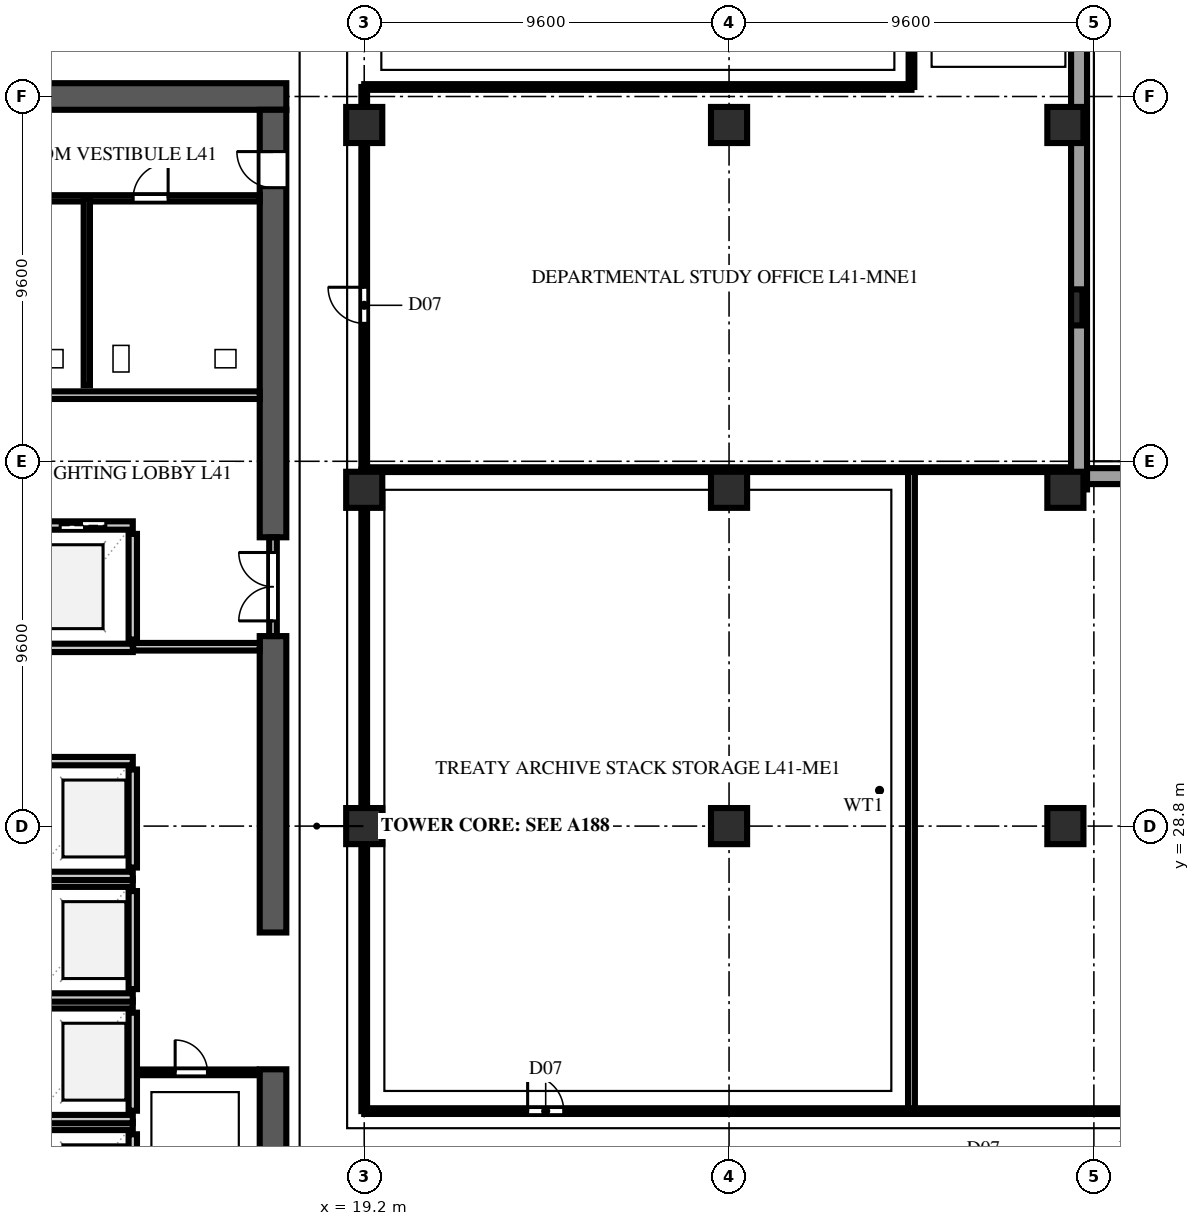
"""IFC4 building model, lengths in metres.
Left out: names, types, materials, properties, quantities, classifications, styles, units other than length and angle.
Written with IfcOpenShell. Run it as: python <this file> out.ifc"""

import sys

from ifc_helpers import new_model, si_unit, direction, frame, frame_2d, origin, origin_2d, place, context, subcontext, project, spatial, rectangle, extrude, element, fill, save


model = new_model("IFC4")
c1 = context("Model", 3, precision=1e-05, world=origin(), true_north=direction((0.0, 1.0)))
c2 = subcontext(c1, "Body", "Model", "MODEL_VIEW")
j1 = project(units=[si_unit("LENGTHUNIT", "METRE"), si_unit("PLANEANGLEUNIT", "RADIAN")], contexts=[c1])
p1 = place(None, origin())
s1 = spatial("IfcSite", under=j1, at=p1, CompositionType="ELEMENT")
p2 = place(p1, origin())
s2 = spatial("IfcBuilding", under=s1, at=p2, CompositionType="ELEMENT")
p3 = place(p2, frame((0.0, 0.0, 163.6)))
s3 = spatial("IfcBuildingStorey", under=s2, at=p3, CompositionType="ELEMENT", Elevation=163.6)
p4 = place(p3, frame((2.55, 48.0, 0.0), z_axis=(0.0, 0.0, 1.0), x_axis=(1.0, 0.0, 0.0)))
e1 = element("IfcWall", 1, at=p4, inside=s3, PredefinedType="SHEAR", context=c2, shape_type="SweptSolid", body=[
    extrude(rectangle(XDim=14.6, YDim=0.7, at=frame_2d((7.3, 0.0))), origin(), (0.0, 0.0, 1.0), 3.54),
])
p5 = place(p3, frame((16.8, 9.95, 0.0), z_axis=(0.0, 0.0, 1.0), x_axis=(0.0, 1.0, 0.0)))
e2 = element("IfcWall", 2, at=p5, inside=s3, PredefinedType="SHEAR", context=c2, shape_type="SweptSolid", body=[
    extrude(rectangle(XDim=12.45, YDim=0.7, at=frame_2d((6.225, 0.0))), origin(), (0.0, 0.0, 1.0), 3.54),
])
p6 = place(p5, frame((0.19, 0.0, 0.0)))
e3 = element("IfcOpeningElement", 3, at=p6, cuts=e2, PredefinedType="OPENING", context=c2, shape_type="SweptSolid", body=[
    extrude(rectangle(XDim=1.1, YDim=2.2, at=frame_2d((0.55, 1.1))), frame((0.0, 0.362, 0.0), z_axis=(0.0, -1.0, 0.0), x_axis=(1.0, 0.0, 0.0)), (0.0, 0.0, 1.0), 0.724),
])
p7 = place(p3, frame((16.8, 26.0, 0.0), z_axis=(0.0, 0.0, 1.0), x_axis=(0.0, 1.0, 0.0)))
e4 = element("IfcWall", 4, at=p7, inside=s3, PredefinedType="SHEAR", context=c2, shape_type="SweptSolid", body=[
    extrude(rectangle(XDim=7.8, YDim=0.7, at=frame_2d((3.9, 0.0))), origin(), (0.0, 0.0, 1.0), 3.54),
])
p8 = place(p3, frame((16.8, 36.4, 0.0), z_axis=(0.0, 0.0, 1.0), x_axis=(0.0, 1.0, 0.0)))
e5 = element("IfcWall", 5, at=p8, inside=s3, PredefinedType="SHEAR", context=c2, shape_type="SweptSolid", body=[
    extrude(rectangle(XDim=11.25, YDim=0.7, at=frame_2d((5.625, 0.0))), origin(), (0.0, 0.0, 1.0), 3.54),
])
p9 = place(p8, frame((9.2, 0.0, 0.0)))
e6 = element("IfcOpeningElement", 6, at=p9, cuts=e5, PredefinedType="OPENING", context=c2, shape_type="SweptSolid", body=[
    extrude(rectangle(XDim=0.95, YDim=2.15, at=frame_2d((0.475, 1.075))), frame((0.0, 0.362, 0.0), z_axis=(0.0, -1.0, 0.0), x_axis=(1.0, 0.0, 0.0)), (0.0, 0.0, 1.0), 0.724),
])
for number, where, z_axis, x_axis in (
    (7, (19.2, 28.8, 0.0), (0.0, 0.0, 1.0), (1.0, 0.0, 0.0)),
    (8, (19.2, 37.65, 0.0), (0.0, 0.0, 1.0), (1.0, 0.0, 0.0)),
    (9, (19.2, 47.25, 0.0), (0.0, 0.0, 1.0), (1.0, 0.0, 0.0)),
    (10, (28.8, 28.8, 0.0), (0.0, 0.0, 1.0), (1.0, 0.0, 0.0)),
    (11, (28.8, 37.65, 0.0), (0.0, 0.0, 1.0), (1.0, 0.0, 0.0)),
    (12, (28.8, 47.25, 0.0), (0.0, 0.0, 1.0), (1.0, 0.0, 0.0)),
    (13, (37.65, 28.8, 0.0), (0.0, 0.0, 1.0), (1.0, 0.0, 0.0)),
    (14, (37.65, 37.65, 0.0), (0.0, 0.0, 1.0), (1.0, 0.0, 0.0)),
    (15, (37.65, 47.25, 0.0), (0.0, 0.0, 1.0), (1.0, 0.0, 0.0)),
):
    element("IfcColumn", number, at=place(p3, frame(where, z_axis=z_axis, x_axis=x_axis)), inside=s3, PredefinedType="COLUMN", context=c2, shape_type="SweptSolid", body=[
        extrude(rectangle(XDim=0.95, YDim=0.95, at=origin_2d()), origin(), (0.0, 0.0, 1.0), 3.8),
    ])
p10 = place(p3, frame((37.95, 42.45, 0.0), z_axis=(0.0, 0.0, 1.0), x_axis=(0.0, 1.0, 0.0)))
e16 = element("IfcColumn", 16, at=p10, inside=s3, PredefinedType="PILASTER", context=c2, shape_type="SweptSolid", body=[
    extrude(rectangle(XDim=0.95, YDim=0.3, at=origin_2d()), origin(), (0.0, 0.0, 1.0), 3.8),
])
p11 = place(p3, frame((55.76, 38.01, 0.0), z_axis=(0.0, 0.0, 1.0), x_axis=(-1.0, 0.0, 0.0)))
e17 = element("IfcWall", 17, at=p11, inside=s3, PredefinedType="SOLIDWALL", context=c2, shape_type="SweptSolid", body=[
    extrude(rectangle(XDim=18.1, YDim=0.42, at=frame_2d((9.05, 0.0))), origin(), (0.0, 0.0, 1.0), 3.54),
])
p12 = place(p3, frame((38.01, 37.66, 0.0), z_axis=(0.0, 0.0, 1.0), x_axis=(0.0, 1.0, 0.0)))
e18 = element("IfcWall", 18, at=p12, inside=s3, PredefinedType="SOLIDWALL", context=c2, shape_type="SweptSolid", body=[
    extrude(rectangle(XDim=27.7, YDim=0.42, at=frame_2d((13.85, 0.0))), origin(), (0.0, 0.0, 1.0), 3.54),
])
p13 = place(p3, frame((13.11, 18.11, 0.0), z_axis=(0.0, 0.0, 1.0), x_axis=(0.0, 1.0, 0.0)))
e19 = element("IfcWall", 19, at=p13, inside=s3, PredefinedType="SOLIDWALL", context=c2, shape_type="SweptSolid", body=[
    extrude(rectangle(XDim=2.58, YDim=0.22, at=frame_2d((1.29, 0.0))), origin(), (0.0, 0.0, 1.0), 3.54),
])
p14 = place(p3, frame((10.49, 20.91, 0.0), z_axis=(0.0, 0.0, 1.0), x_axis=(1.0, 0.0, 0.0)))
e20 = element("IfcWall", 20, at=p14, inside=s3, PredefinedType="SOLIDWALL", context=c2, shape_type="SweptSolid", body=[
    extrude(rectangle(XDim=2.62, YDim=0.22, at=frame_2d((1.31, 0.0))), origin(), (0.0, 0.0, 1.0), 3.54),
])
p15 = place(p3, frame((13.11, 21.31, 0.0), z_axis=(0.0, 0.0, 1.0), x_axis=(0.0, 1.0, 0.0)))
e21 = element("IfcWall", 21, at=p15, inside=s3, PredefinedType="SOLIDWALL", context=c2, shape_type="SweptSolid", body=[
    extrude(rectangle(XDim=2.58, YDim=0.22, at=frame_2d((1.29, 0.0))), origin(), (0.0, 0.0, 1.0), 3.54),
])
for number, where, z_axis, x_axis in (
    (22, (10.49, 21.09, 0.0), (0.0, 0.0, 1.0), (1.0, 0.0, 0.0)),
    (23, (10.49, 24.11, 0.0), (0.0, 0.0, 1.0), (1.0, 0.0, 0.0)),
):
    element("IfcWall", number, at=place(p3, frame(where, z_axis=z_axis, x_axis=x_axis)), inside=s3, PredefinedType="SOLIDWALL", context=c2, shape_type="SweptSolid", body=[
        extrude(rectangle(XDim=2.62, YDim=0.22, at=frame_2d((1.31, 0.0))), origin(), (0.0, 0.0, 1.0), 3.54),
    ])
p16 = place(p3, frame((13.11, 24.51, 0.0), z_axis=(0.0, 0.0, 1.0), x_axis=(0.0, 1.0, 0.0)))
e24 = element("IfcWall", 24, at=p16, inside=s3, PredefinedType="SOLIDWALL", context=c2, shape_type="SweptSolid", body=[
    extrude(rectangle(XDim=2.58, YDim=0.22, at=frame_2d((1.29, 0.0))), origin(), (0.0, 0.0, 1.0), 3.54),
])
for number, where, z_axis, x_axis in (
    (25, (10.49, 24.29, 0.0), (0.0, 0.0, 1.0), (1.0, 0.0, 0.0)),
    (26, (10.49, 27.31, 0.0), (0.0, 0.0, 1.0), (1.0, 0.0, 0.0)),
):
    element("IfcWall", number, at=place(p3, frame(where, z_axis=z_axis, x_axis=x_axis)), inside=s3, PredefinedType="SOLIDWALL", context=c2, shape_type="SweptSolid", body=[
        extrude(rectangle(XDim=2.62, YDim=0.22, at=frame_2d((1.31, 0.0))), origin(), (0.0, 0.0, 1.0), 3.54),
    ])
p17 = place(p3, frame((13.11, 27.71, 0.0), z_axis=(0.0, 0.0, 1.0), x_axis=(0.0, 1.0, 0.0)))
e27 = element("IfcWall", 27, at=p17, inside=s3, PredefinedType="SOLIDWALL", context=c2, shape_type="SweptSolid", body=[
    extrude(rectangle(XDim=2.58, YDim=0.22, at=frame_2d((1.29, 0.0))), origin(), (0.0, 0.0, 1.0), 3.54),
])
for number, where, z_axis, x_axis in (
    (28, (10.49, 27.49, 0.0), (0.0, 0.0, 1.0), (1.0, 0.0, 0.0)),
    (29, (10.49, 30.51, 0.0), (0.0, 0.0, 1.0), (1.0, 0.0, 0.0)),
):
    element("IfcWall", number, at=place(p3, frame(where, z_axis=z_axis, x_axis=x_axis)), inside=s3, PredefinedType="SOLIDWALL", context=c2, shape_type="SweptSolid", body=[
        extrude(rectangle(XDim=2.62, YDim=0.22, at=frame_2d((1.31, 0.0))), origin(), (0.0, 0.0, 1.0), 3.54),
    ])
p18 = place(p3, frame((13.11, 33.71, 0.0), z_axis=(0.0, 0.0, 1.0), x_axis=(0.0, 1.0, 0.0)))
e30 = element("IfcWall", 30, at=p18, inside=s3, PredefinedType="SOLIDWALL", context=c2, shape_type="SweptSolid", body=[
    extrude(rectangle(XDim=2.78, YDim=0.22, at=frame_2d((1.39, 0.0))), origin(), (0.0, 0.0, 1.0), 3.54),
])
p19 = place(p3, frame((10.49, 33.49, 0.0), z_axis=(0.0, 0.0, 1.0), x_axis=(1.0, 0.0, 0.0)))
e31 = element("IfcWall", 31, at=p19, inside=s3, PredefinedType="SOLIDWALL", context=c2, shape_type="SweptSolid", body=[
    extrude(rectangle(XDim=2.62, YDim=0.22, at=frame_2d((1.31, 0.0))), origin(), (0.0, 0.0, 1.0), 3.54),
])
p20 = place(p3, frame((10.49, 36.71, 0.0), z_axis=(0.0, 0.0, 1.0), x_axis=(1.0, 0.0, 0.0)))
e32 = element("IfcWall", 32, at=p20, inside=s3, PredefinedType="SOLIDWALL", context=c2, shape_type="SweptSolid", body=[
    extrude(rectangle(XDim=2.62, YDim=0.22, at=frame_2d((1.31, 0.0))), origin(), (0.0, 0.0, 1.0), 3.54),
])
p21 = place(p20, frame((0.71, 0.0, 0.0)))
e33 = element("IfcOpeningElement", 33, at=p21, cuts=e32, PredefinedType="OPENING", context=c2, shape_type="SweptSolid", body=[
    extrude(rectangle(XDim=1.2, YDim=2.2, at=frame_2d((0.6, 1.1))), frame((0.0, 0.122, 0.0), z_axis=(0.0, -1.0, 0.0), x_axis=(1.0, 0.0, 0.0)), (0.0, 0.0, 1.0), 0.244),
])
p22 = place(p3, frame((13.12, 33.52, 0.0), z_axis=(0.0, 0.0, 1.0), x_axis=(1.0, 0.0, 0.0)))
e34 = element("IfcWall", 34, at=p22, inside=s3, PredefinedType="SOLIDWALL", context=c2, shape_type="SweptSolid", body=[
    extrude(rectangle(XDim=3.33, YDim=0.2, at=frame_2d((1.665, 0.0))), origin(), (0.0, 0.0, 1.0), 3.54),
])
p23 = place(p3, frame((6.32, 40.14, 0.0), z_axis=(0.0, 0.0, 1.0), x_axis=(1.0, 0.0, 0.0)))
e35 = element("IfcWall", 35, at=p23, inside=s3, PredefinedType="SOLIDWALL", context=c2, shape_type="SweptSolid", body=[
    extrude(rectangle(XDim=10.13, YDim=0.2, at=frame_2d((5.065, 0.0))), origin(), (0.0, 0.0, 1.0), 3.54),
])
p24 = place(p3, frame((16.8, 33.8, 0.0), z_axis=(0.0, 0.0, 1.0), x_axis=(0.0, 1.0, 0.0)))
e36 = element("IfcWall", 36, at=p24, inside=s3, PredefinedType="SOLIDWALL", context=c2, shape_type="SweptSolid", body=[
    extrude(rectangle(XDim=2.6, YDim=0.2, at=frame_2d((1.3, 0.0))), origin(), (0.0, 0.0, 1.0), 3.54),
])
p25 = place(p24, frame((0.4, 0.0, 0.0)))
e37 = element("IfcOpeningElement", 37, at=p25, cuts=e36, PredefinedType="OPENING", context=c2, shape_type="SweptSolid", body=[
    extrude(rectangle(XDim=1.8, YDim=2.2, at=frame_2d((0.9, 1.1))), frame((0.0, 0.112, 0.0), z_axis=(0.0, -1.0, 0.0), x_axis=(1.0, 0.0, 0.0)), (0.0, 0.0, 1.0), 0.224),
])
p26 = place(p3, frame((13.225, 22.32, 0.0), z_axis=(0.0, 0.0, 1.0), x_axis=(1.0, 0.0, 0.0)))
e38 = element("IfcWall", 38, at=p26, inside=s3, PredefinedType="PARTITIONING", context=c2, shape_type="SweptSolid", body=[
    extrude(rectangle(XDim=3.12, YDim=0.15, at=frame_2d((1.56, 0.0))), origin(), (0.0, 0.0, 1.0), 3.54),
])
p27 = place(p26, frame((1.0, 0.0, 0.0)))
e39 = element("IfcOpeningElement", 39, at=p27, cuts=e38, PredefinedType="OPENING", context=c2, shape_type="SweptSolid", body=[
    extrude(rectangle(XDim=0.85, YDim=2.1, at=frame_2d((0.425, 1.05))), frame((0.0, 0.087, 0.0), z_axis=(0.0, -1.0, 0.0), x_axis=(1.0, 0.0, 0.0)), (0.0, 0.0, 1.0), 0.174),
])
p28 = place(p3, frame((6.32, 45.32, 0.0), z_axis=(0.0, 0.0, 1.0), x_axis=(1.0, 0.0, 0.0)))
e40 = element("IfcWall", 40, at=p28, inside=s3, PredefinedType="PLUMBINGWALL", context=c2, shape_type="SweptSolid", body=[
    extrude(rectangle(XDim=10.13, YDim=0.165, at=frame_2d((5.065, 0.0))), origin(), (0.0, 0.0, 1.0), 3.54),
])
p29 = place(p28, frame((1.8, 0.0, 0.0)))
e41 = element("IfcOpeningElement", 41, at=p29, cuts=e40, PredefinedType="OPENING", context=c2, shape_type="SweptSolid", body=[
    extrude(rectangle(XDim=0.92, YDim=2.15, at=frame_2d((0.46, 1.075))), frame((0.0, 0.094, 0.0), z_axis=(0.0, -1.0, 0.0), x_axis=(1.0, 0.0, 0.0)), (0.0, 0.0, 1.0), 0.189),
])
p30 = place(p28, frame((6.8, 0.0, 0.0)))
e42 = element("IfcOpeningElement", 42, at=p30, cuts=e40, PredefinedType="OPENING", context=c2, shape_type="SweptSolid", body=[
    extrude(rectangle(XDim=0.92, YDim=2.15, at=frame_2d((0.46, 1.075))), frame((0.0, 0.094, 0.0), z_axis=(0.0, -1.0, 0.0), x_axis=(1.0, 0.0, 0.0)), (0.0, 0.0, 1.0), 0.189),
])
p31 = place(p3, frame((11.9, 40.4, 0.0), z_axis=(0.0, 0.0, 1.0), x_axis=(0.0, 1.0, 0.0)))
e43 = element("IfcWall", 43, at=p31, inside=s3, PredefinedType="PLUMBINGWALL", context=c2, shape_type="SweptSolid", body=[
    extrude(rectangle(XDim=4.92, YDim=0.165, at=frame_2d((2.46, 0.0))), origin(), (0.0, 0.0, 1.0), 3.54),
])
p32 = place(p3, frame((33.6, 21.3, 0.0), z_axis=(0.0, 0.0, 1.0), x_axis=(0.0, 1.0, 0.0)))
e44 = element("IfcWall", 44, at=p32, inside=s3, PredefinedType="PARTITIONING", context=c2, shape_type="SweptSolid", body=[
    extrude(rectangle(XDim=16.88, YDim=0.18, at=frame_2d((8.44, 0.0))), origin(), (0.0, 0.0, 1.0), 3.54),
])
p33 = place(p3, frame((19.2, 21.3, 0.0), z_axis=(0.0, 0.0, 1.0), x_axis=(1.0, 0.0, 0.0)))
e45 = element("IfcWall", 45, at=p33, inside=s3, PredefinedType="PARTITIONING", context=c2, shape_type="SweptSolid", body=[
    extrude(rectangle(XDim=38.18, YDim=0.15, at=frame_2d((19.09, 0.0))), origin(), (0.0, 0.0, 1.0), 3.54),
])
p34 = place(p33, frame((4.3, 0.0, 0.0)))
e46 = element("IfcOpeningElement", 46, at=p34, cuts=e45, PredefinedType="OPENING", context=c2, shape_type="SweptSolid", body=[
    extrude(rectangle(XDim=0.95, YDim=2.15, at=frame_2d((0.475, 1.075))), frame((0.0, 0.087, 0.0), z_axis=(0.0, -1.0, 0.0), x_axis=(1.0, 0.0, 0.0)), (0.0, 0.0, 1.0), 0.174),
])
p35 = place(p33, frame((22.7, 0.0, 0.0)))
e47 = element("IfcOpeningElement", 47, at=p35, cuts=e45, PredefinedType="OPENING", context=c2, shape_type="SweptSolid", body=[
    extrude(rectangle(XDim=0.95, YDim=2.15, at=frame_2d((0.475, 1.075))), frame((0.0, 0.087, 0.0), z_axis=(0.0, -1.0, 0.0), x_axis=(1.0, 0.0, 0.0)), (0.0, 0.0, 1.0), 0.174),
])
p36 = place(p3, frame((19.2, 21.3, 0.0), z_axis=(0.0, 0.0, 1.0), x_axis=(0.0, 1.0, 0.0)))
e48 = element("IfcWall", 48, at=p36, inside=s3, PredefinedType="PARTITIONING", context=c2, shape_type="SweptSolid", body=[
    extrude(rectangle(XDim=16.88, YDim=0.15, at=frame_2d((8.44, 0.0))), origin(), (0.0, 0.0, 1.0), 3.123),
])
p37 = place(p3, frame((19.28, 38.18, 0.0), z_axis=(0.0, 0.0, 1.0), x_axis=(1.0, 0.0, 0.0)))
e49 = element("IfcWall", 49, at=p37, inside=s3, PredefinedType="PARTITIONING", context=c2, shape_type="SweptSolid", body=[
    extrude(rectangle(XDim=18.37, YDim=0.125, at=frame_2d((9.185, 0.0))), origin(), (0.0, 0.0, 1.0), 3.54),
])
p38 = place(p3, frame((19.2, 38.18, 0.0), z_axis=(0.0, 0.0, 1.0), x_axis=(0.0, 1.0, 0.0)))
e50 = element("IfcWall", 50, at=p38, inside=s3, PredefinedType="PARTITIONING", context=c2, shape_type="SweptSolid", body=[
    extrude(rectangle(XDim=10.07, YDim=0.15, at=frame_2d((5.035, 0.0))), origin(), (0.0, 0.0, 1.0), 3.123),
])
p39 = place(p38, frame((3.85, 0.0, 0.0)))
e51 = element("IfcOpeningElement", 51, at=p39, cuts=e50, PredefinedType="OPENING", context=c2, shape_type="SweptSolid", body=[
    extrude(rectangle(XDim=0.95, YDim=2.15, at=frame_2d((0.475, 1.075))), frame((0.0, 0.087, 0.0), z_axis=(0.0, -1.0, 0.0), x_axis=(1.0, 0.0, 0.0)), (0.0, 0.0, 1.0), 0.174),
])
p40 = place(p3, frame((19.2, 48.25, 0.0), z_axis=(0.0, 0.0, 1.0), x_axis=(1.0, 0.0, 0.0)))
e52 = element("IfcWall", 52, at=p40, inside=s3, PredefinedType="PARTITIONING", context=c2, shape_type="SweptSolid", body=[
    extrude(rectangle(XDim=14.4, YDim=0.15, at=frame_2d((7.2, 0.0))), origin(), (0.0, 0.0, 1.0), 3.54),
])
p41 = place(p3, frame((33.6, 48.25, 0.0), z_axis=(0.0, 0.0, 1.0), x_axis=(0.0, 1.0, 0.0)))
e53 = element("IfcWall", 53, at=p41, inside=s3, PredefinedType="PARTITIONING", context=c2, shape_type="SweptSolid", body=[
    extrude(rectangle(XDim=18.73, YDim=0.15, at=frame_2d((9.365, 0.0))), origin(), (0.0, 0.0, 1.0), 3.54),
])
p42 = place(p41, frame((3.4, 0.0, 0.0)))
e54 = element("IfcOpeningElement", 54, at=p42, cuts=e53, PredefinedType="OPENING", context=c2, shape_type="SweptSolid", body=[
    extrude(rectangle(XDim=0.95, YDim=2.15, at=frame_2d((0.475, 1.075))), frame((0.0, 0.087, 0.0), z_axis=(0.0, -1.0, 0.0), x_axis=(1.0, 0.0, 0.0)), (0.0, 0.0, 1.0), 0.174),
])
p43 = place(p21, origin())
e55 = element("IfcDoor", 55, at=p43, inside=s3, OperationType="DOUBLE_DOOR_SLIDING", PredefinedType="DOOR", context=c2, shape_type="SweptSolid", body=[
    extrude(rectangle(XDim=1.2, YDim=2.2, at=frame_2d((0.6, 1.1))), frame((0.0, 0.025, 0.0), z_axis=(0.0, -1.0, 0.0), x_axis=(1.0, 0.0, 0.0)), (0.0, 0.0, 1.0), 0.05),
])
fill(e33, e55)
p44 = place(p9, origin())
e56 = element("IfcDoor", 56, at=p44, inside=s3, OperationType="SINGLE_SWING_RIGHT", PredefinedType="DOOR", context=c2, shape_type="SweptSolid", body=[
    extrude(rectangle(XDim=0.95, YDim=2.15, at=frame_2d((0.475, 1.075))), frame((0.0, 0.025, 0.0), z_axis=(0.0, -1.0, 0.0), x_axis=(1.0, 0.0, 0.0)), (0.0, 0.0, 1.0), 0.05),
])
fill(e6, e56)
p45 = place(p25, origin())
e57 = element("IfcDoor", 57, at=p45, inside=s3, OperationType="DOUBLE_DOOR_SINGLE_SWING", PredefinedType="DOOR", context=c2, shape_type="SweptSolid", body=[
    extrude(rectangle(XDim=1.8, YDim=2.2, at=frame_2d((0.9, 1.1))), frame((0.0, 0.025, 0.0), z_axis=(0.0, -1.0, 0.0), x_axis=(1.0, 0.0, 0.0)), (0.0, 0.0, 1.0), 0.05),
])
fill(e37, e57)
p46 = place(p27, origin())
e58 = element("IfcDoor", 58, at=p46, inside=s3, OperationType="SINGLE_SWING_LEFT", PredefinedType="DOOR", context=c2, shape_type="SweptSolid", body=[
    extrude(rectangle(XDim=0.85, YDim=2.1, at=frame_2d((0.425, 1.05))), frame((0.0, 0.025, 0.0), z_axis=(0.0, -1.0, 0.0), x_axis=(1.0, 0.0, 0.0)), (0.0, 0.0, 1.0), 0.05),
])
fill(e39, e58)
p47 = place(p30, origin())
e59 = element("IfcDoor", 59, at=p47, inside=s3, OperationType="SINGLE_SWING_RIGHT", PredefinedType="DOOR", context=c2, shape_type="SweptSolid", body=[
    extrude(rectangle(XDim=0.92, YDim=2.15, at=frame_2d((0.46, 1.075))), frame((0.0, 0.025, 0.0), z_axis=(0.0, -1.0, 0.0), x_axis=(1.0, 0.0, 0.0)), (0.0, 0.0, 1.0), 0.05),
])
fill(e42, e59)
p48 = place(p34, origin())
e60 = element("IfcDoor", 60, at=p48, inside=s3, OperationType="SINGLE_SWING_LEFT", PredefinedType="DOOR", context=c2, shape_type="SweptSolid", body=[
    extrude(rectangle(XDim=0.95, YDim=2.15, at=frame_2d((0.475, 1.075))), frame((0.0, 0.025, 0.0), z_axis=(0.0, -1.0, 0.0), x_axis=(1.0, 0.0, 0.0)), (0.0, 0.0, 1.0), 0.05),
])
fill(e46, e60)
p49 = place(p39, origin())
e61 = element("IfcDoor", 61, at=p49, inside=s3, OperationType="SINGLE_SWING_RIGHT", PredefinedType="DOOR", context=c2, shape_type="SweptSolid", body=[
    extrude(rectangle(XDim=0.95, YDim=2.15, at=frame_2d((0.475, 1.075))), frame((0.0, 0.025, 0.0), z_axis=(0.0, -1.0, 0.0), x_axis=(1.0, 0.0, 0.0)), (0.0, 0.0, 1.0), 0.05),
])
fill(e51, e61)
save(model, sys.argv[1])
